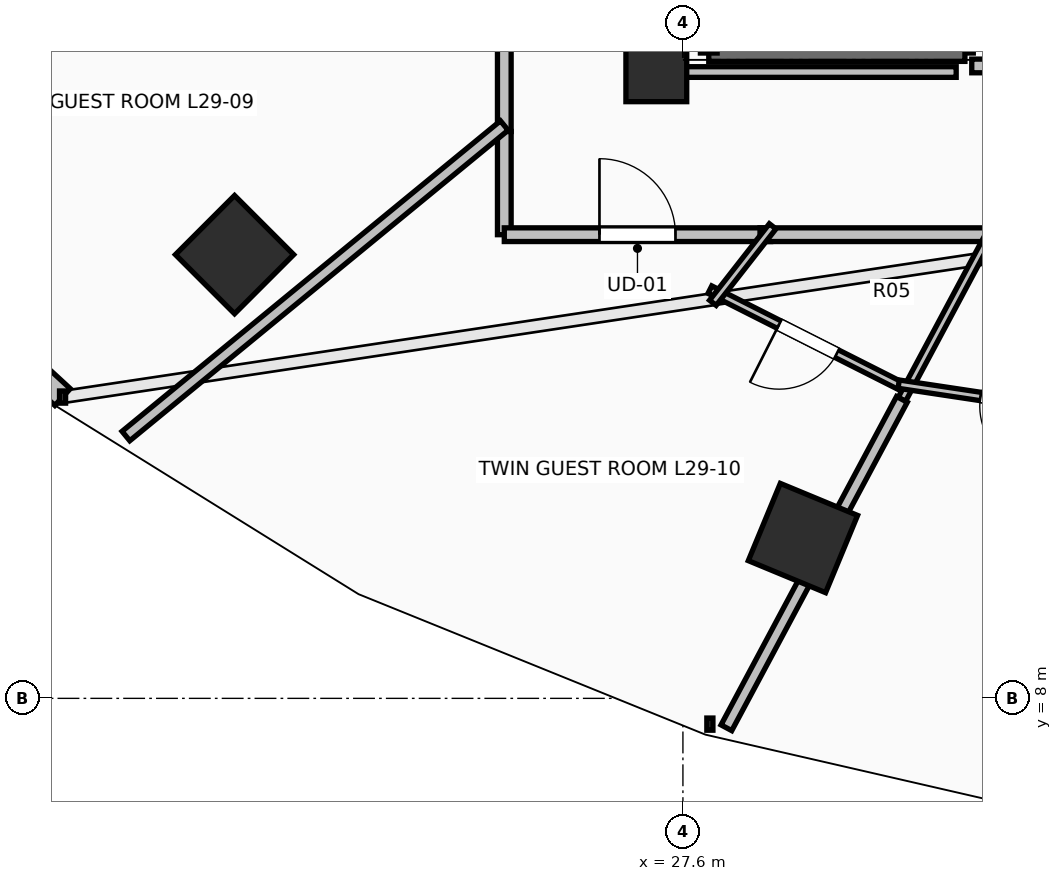
"""IFC4 building model, lengths in metres.
Left out: names, types, materials, properties, quantities, classifications, styles, units other than length and angle.
Written with IfcOpenShell. Run it as: python <this file> out.ifc"""

import sys

from ifc_helpers import new_model, si_unit, direction, frame, frame_2d, origin, origin_2d, place, context, subcontext, project, spatial, rectangle, extrude, element, fill, save


model = new_model("IFC4")
c1 = context("Model", 3, precision=1e-05, world=origin(), true_north=direction((0.0, 1.0)))
c2 = subcontext(c1, "Body", "Model", "MODEL_VIEW")
j1 = project(units=[si_unit("LENGTHUNIT", "METRE"), si_unit("PLANEANGLEUNIT", "RADIAN")], contexts=[c1])
p1 = place(None, origin())
s1 = spatial("IfcSite", under=j1, at=p1, CompositionType="ELEMENT")
p2 = place(p1, origin())
s2 = spatial("IfcBuilding", under=s1, at=p2, CompositionType="ELEMENT")
p3 = place(p2, frame((0.0, 0.0, 110.3)))
s3 = spatial("IfcBuildingStorey", under=s2, at=p3, CompositionType="ELEMENT", Elevation=110.3)
for number, where, z_axis, x_axis in (
    (1, (21.701, 13.838, 0.0), (0.0, 0.0, 1.0), (-0.707, -0.707, 0.0)),
    (2, (29.179, 10.109, 0.0), (0.0, 0.0, 1.0), (-0.383, -0.924, 0.0)),
):
    element("IfcColumn", number, at=place(p3, frame(where, z_axis=z_axis, x_axis=x_axis)), inside=s3, PredefinedType="COLUMN", context=c2, shape_type="SweptSolid", body=[
        extrude(rectangle(XDim=1.1, YDim=1.1, at=origin_2d()), origin(), (0.0, 0.0, 1.0), 3.5),
    ])
p4 = place(p3, frame((27.25, 16.45, 0.0), z_axis=(0.0, 0.0, 1.0), x_axis=(1.0, 0.0, 0.0)))
e3 = element("IfcColumn", 3, at=p4, inside=s3, PredefinedType="PILASTER", context=c2, shape_type="SweptSolid", body=[
    extrude(rectangle(XDim=0.8, YDim=1.2, at=origin_2d()), origin(), (0.0, 0.0, 1.0), 3.5),
])
p5 = place(p3, frame((16.174, 14.972, 0.0), z_axis=(0.0, 0.0, 1.0), x_axis=(0.735416718093, -0.677615119924, 0.0)))
e4 = element("IfcWall", 4, at=p5, inside=s3, PredefinedType="STANDARD", context=c2, shape_type="SweptSolid", body=[
    extrude(rectangle(XDim=4.439, YDim=0.3, at=frame_2d((2.22, 0.0))), origin(), (0.0, 0.0, 1.0), 3.24),
])
p6 = place(p5, frame((1.619, 0.0, 0.85)))
e5 = element("IfcOpeningElement", 5, at=p6, cuts=e4, PredefinedType="OPENING", context=c2, shape_type="SweptSolid", body=[
    extrude(rectangle(XDim=1.2, YDim=1.95, at=frame_2d((0.6, 0.975))), frame((0.0, 0.165, 0.0), z_axis=(0.0, -1.0, 0.0), x_axis=(1.0, 0.0, 0.0)), (0.0, 0.0, 1.0), 0.33),
])
p7 = place(p3, frame((31.31, 23.91, 0.0), z_axis=(0.0, 0.0, 1.0), x_axis=(0.0, -1.0, 0.0)))
e6 = element("IfcWall", 6, at=p7, inside=s3, PredefinedType="SOLIDWALL", context=c2, shape_type="SweptSolid", body=[
    extrude(rectangle(XDim=7.42, YDim=0.22, at=frame_2d((3.71, 0.0))), origin(), (0.0, 0.0, 1.0), 3.24),
])
p8 = place(p3, frame((31.31, 16.49, 0.0), z_axis=(0.0, 0.0, 1.0), x_axis=(-1.0, 0.0, 0.0)))
e7 = element("IfcWall", 7, at=p8, inside=s3, PredefinedType="SOLIDWALL", context=c2, shape_type="SweptSolid", body=[
    extrude(rectangle(XDim=3.37, YDim=0.22, at=frame_2d((1.685, 0.0))), origin(), (0.0, 0.0, 1.0), 3.24),
])
p9 = place(p3, frame((27.94, 16.49, 0.0), z_axis=(0.0, 0.0, 1.0), x_axis=(0.0, 1.0, 0.0)))
e8 = element("IfcWall", 8, at=p9, inside=s3, PredefinedType="SOLIDWALL", context=c2, shape_type="SweptSolid", body=[
    extrude(rectangle(XDim=7.42, YDim=0.22, at=frame_2d((3.71, 0.0))), origin(), (0.0, 0.0, 1.0), 3.24),
])
p10 = place(p3, frame((31.4, 16.32, 0.0), z_axis=(0.0, 0.0, 1.0), x_axis=(1.0, 0.0, 0.0)))
e9 = element("IfcWall", 9, at=p10, inside=s3, PredefinedType="PARTITIONING", context=c2, shape_type="SweptSolid", body=[
    extrude(rectangle(XDim=4.4, YDim=0.18, at=frame_2d((2.2, 0.0))), origin(), (0.0, 0.0, 1.0), 3.24),
])
p11 = place(p10, frame((1.775, 0.0, 0.0)))
e10 = element("IfcOpeningElement", 10, at=p11, cuts=e9, PredefinedType="OPENING", context=c2, shape_type="SweptSolid", body=[
    extrude(rectangle(XDim=0.85, YDim=2.1, at=frame_2d((0.425, 1.05))), frame((0.0, 0.105, 0.0), z_axis=(0.0, -1.0, 0.0), x_axis=(1.0, 0.0, 0.0)), (0.0, 0.0, 1.0), 0.21),
])
p12 = place(p3, frame((25.25, 19.626, 0.0), z_axis=(0.0, 0.0, 1.0), x_axis=(0.0, -1.0, 0.0)))
e11 = element("IfcWall", 11, at=p12, inside=s3, PredefinedType="PARTITIONING", context=c2, shape_type="SweptSolid", body=[
    extrude(rectangle(XDim=4.168, YDim=0.18, at=frame_2d((2.084, 0.0))), origin(), (0.0, 0.0, 1.0), 2.432),
])
p13 = place(p12, frame((1.584, 0.0, 0.0)))
e12 = element("IfcOpeningElement", 12, at=p13, cuts=e11, PredefinedType="OPENING", context=c2, shape_type="SweptSolid", body=[
    extrude(rectangle(XDim=1.0, YDim=2.15, at=frame_2d((0.5, 1.075))), frame((0.0, 0.105, 0.0), z_axis=(0.0, -1.0, 0.0), x_axis=(1.0, 0.0, 0.0)), (0.0, 0.0, 1.0), 0.21),
])
p14 = place(p3, frame((25.25, 15.458, 0.0), z_axis=(0.0, 0.0, 1.0), x_axis=(0.0, -1.0, 0.0)))
e13 = element("IfcWall", 13, at=p14, inside=s3, PredefinedType="PARTITIONING", context=c2, shape_type="SweptSolid", body=[
    extrude(rectangle(XDim=1.358, YDim=0.18, at=frame_2d((0.679, 0.0))), origin(), (0.0, 0.0, 1.0), 2.432),
])
p15 = place(p3, frame((25.25, 14.1, 0.0), z_axis=(0.0, 0.0, 1.0), x_axis=(1.0, 0.0, 0.0)))
e14 = element("IfcWall", 14, at=p15, inside=s3, PredefinedType="PARTITIONING", context=c2, shape_type="SweptSolid", body=[
    extrude(rectangle(XDim=3.504, YDim=0.18, at=frame_2d((1.752, 0.0))), origin(), (0.0, 0.0, 1.0), 2.432),
])
p16 = place(p15, frame((1.252, 0.0, 0.0)))
e15 = element("IfcOpeningElement", 15, at=p16, cuts=e14, PredefinedType="OPENING", context=c2, shape_type="SweptSolid", body=[
    extrude(rectangle(XDim=1.0, YDim=2.15, at=frame_2d((0.5, 1.075))), frame((0.0, 0.105, 0.0), z_axis=(0.0, -1.0, 0.0), x_axis=(1.0, 0.0, 0.0)), (0.0, 0.0, 1.0), 0.21),
])
p17 = place(p3, frame((28.614, 14.1, 0.0), z_axis=(0.0, 0.0, 1.0), x_axis=(1.0, 0.0, 0.0)))
e16 = element("IfcWall", 16, at=p17, inside=s3, PredefinedType="PARTITIONING", context=c2, shape_type="SweptSolid", body=[
    extrude(rectangle(XDim=3.225, YDim=0.18, at=frame_2d((1.613, 0.0))), origin(), (0.0, 0.0, 1.0), 2.929),
])
p18 = place(p3, frame((20.272, 11.451, 0.0), z_axis=(0.0, 0.0, 1.0), x_axis=(0.7730409537, 0.634356117573, 0.0)))
e17 = element("IfcWall", 17, at=p18, inside=s3, PredefinedType="PARTITIONING", context=c2, shape_type="SweptSolid", body=[
    extrude(rectangle(XDim=6.439, YDim=0.16, at=frame_2d((3.22, 0.0))), origin(), (0.0, 0.0, 1.0), 2.432),
])
p19 = place(p3, frame((30.533, 12.075, 0.0), z_axis=(0.0, 0.0, 1.0), x_axis=(-0.89257679281, 0.450895407979, 0.0)))
e18 = element("IfcWall", 18, at=p19, inside=s3, PredefinedType="PARTITIONING", context=c2, shape_type="SweptSolid", body=[
    extrude(rectangle(XDim=2.888, YDim=0.11, at=frame_2d((1.444, 0.0))), origin(), (0.0, 0.0, 1.0), 2.432),
])
p20 = place(p19, frame((1.019, 0.0, 0.0)))
e19 = element("IfcOpeningElement", 19, at=p20, cuts=e18, PredefinedType="OPENING", context=c2, shape_type="SweptSolid", body=[
    extrude(rectangle(XDim=0.85, YDim=2.1, at=frame_2d((0.425, 1.05))), frame((0.0, 0.07, 0.0), z_axis=(0.0, -1.0, 0.0), x_axis=(1.0, 0.0, 0.0)), (0.0, 0.0, 1.0), 0.14),
])
p21 = place(p3, frame((27.994, 13.204, 0.0), z_axis=(0.0, 0.0, 1.0), x_axis=(0.615632914819, 0.788033066687, 0.0)))
e20 = element("IfcWall", 20, at=p21, inside=s3, PredefinedType="PARTITIONING", context=c2, shape_type="SweptSolid", body=[
    extrude(rectangle(XDim=1.277, YDim=0.11, at=frame_2d((0.639, 0.0))), origin(), (0.0, 0.0, 1.0), 2.432),
])
p22 = place(p3, frame((30.481, 11.934, 0.0), z_axis=(0.0, 0.0, 1.0), x_axis=(0.471456709401, 0.881889205718, 0.0)))
e21 = element("IfcWall", 21, at=p22, inside=s3, PredefinedType="PARTITIONING", context=c2, shape_type="SweptSolid", body=[
    extrude(rectangle(XDim=2.596, YDim=0.11, at=frame_2d((1.298, 0.0))), origin(), (0.0, 0.0, 1.0), 2.886),
])
p23 = place(p3, frame((28.172, 7.613, 0.0), z_axis=(0.0, 0.0, 1.0), x_axis=(0.47136925097, 0.881935955294, 0.0)))
e22 = element("IfcWall", 22, at=p23, inside=s3, PredefinedType="PARTITIONING", context=c2, shape_type="SweptSolid", body=[
    extrude(rectangle(XDim=4.899, YDim=0.16, at=frame_2d((2.449, 0.0))), origin(), (0.0, 0.0, 1.0), 2.677),
])
p24 = place(p3, frame((33.431, 11.683, 0.0), z_axis=(0.0, 0.0, 1.0), x_axis=(-0.988849795555, 0.148916358508, 0.0)))
e23 = element("IfcWall", 23, at=p24, inside=s3, PredefinedType="PARTITIONING", context=c2, shape_type="SweptSolid", body=[
    extrude(rectangle(XDim=3.026, YDim=0.11, at=frame_2d((1.513, 0.0))), origin(), (0.0, 0.0, 1.0), 2.886),
])
p25 = place(p24, frame((1.088, 0.0, 0.0)))
e24 = element("IfcOpeningElement", 24, at=p25, cuts=e23, PredefinedType="OPENING", context=c2, shape_type="SweptSolid", body=[
    extrude(rectangle(XDim=0.85, YDim=2.1, at=frame_2d((0.425, 1.05))), frame((0.0, 0.07, 0.0), z_axis=(0.0, -1.0, 0.0), x_axis=(1.0, 0.0, 0.0)), (0.0, 0.0, 1.0), 0.14),
])
p26 = place(p3, frame((31.195, 16.24, 0.0), z_axis=(0.0, 0.0, 1.0), x_axis=(-1.0, 0.0, 0.0)))
e25 = element("IfcWall", 25, at=p26, inside=s3, PredefinedType="PARTITIONING", context=c2, shape_type="SweptSolid", body=[
    extrude(rectangle(XDim=3.745, YDim=0.14, at=frame_2d((1.873, 0.0))), origin(), (0.0, 0.0, 1.0), 2.432),
])
p27 = place(p3, frame((27.45, 16.24, 0.0), z_axis=(0.0, 0.0, 1.0), x_axis=(0.0, 1.0, 0.0)))
e26 = element("IfcWall", 26, at=p27, inside=s3, PredefinedType="PARTITIONING", context=c2, shape_type="SweptSolid", body=[
    extrude(rectangle(XDim=7.514, YDim=0.14, at=frame_2d((3.757, 0.0))), origin(), (0.0, 0.0, 1.0), 2.432),
])
p28 = place(p16, origin())
e27 = element("IfcDoor", 27, at=p28, inside=s3, OperationType="SINGLE_SWING_LEFT", PredefinedType="DOOR", context=c2, shape_type="SweptSolid", body=[
    extrude(rectangle(XDim=1.0, YDim=2.15, at=frame_2d((0.5, 1.075))), frame((0.0, 0.025, 0.0), z_axis=(0.0, -1.0, 0.0), x_axis=(1.0, 0.0, 0.0)), (0.0, 0.0, 1.0), 0.05),
])
fill(e15, e27)
p29 = place(p20, origin())
e28 = element("IfcDoor", 28, at=p29, inside=s3, OperationType="SINGLE_SWING_RIGHT", PredefinedType="DOOR", context=c2, shape_type="SweptSolid", body=[
    extrude(rectangle(XDim=0.85, YDim=2.1, at=frame_2d((0.425, 1.05))), frame((0.0, 0.025, 0.0), z_axis=(0.0, -1.0, 0.0), x_axis=(1.0, 0.0, 0.0)), (0.0, 0.0, 1.0), 0.05),
])
fill(e19, e28)
p30 = place(p25, origin())
e29 = element("IfcDoor", 29, at=p30, inside=s3, OperationType="SINGLE_SWING_LEFT", PredefinedType="DOOR", context=c2, shape_type="SweptSolid", body=[
    extrude(rectangle(XDim=0.85, YDim=2.1, at=frame_2d((0.425, 1.05))), frame((0.0, 0.025, 0.0), z_axis=(0.0, -1.0, 0.0), x_axis=(1.0, 0.0, 0.0)), (0.0, 0.0, 1.0), 0.05),
])
fill(e24, e29)
save(model, sys.argv[1])
